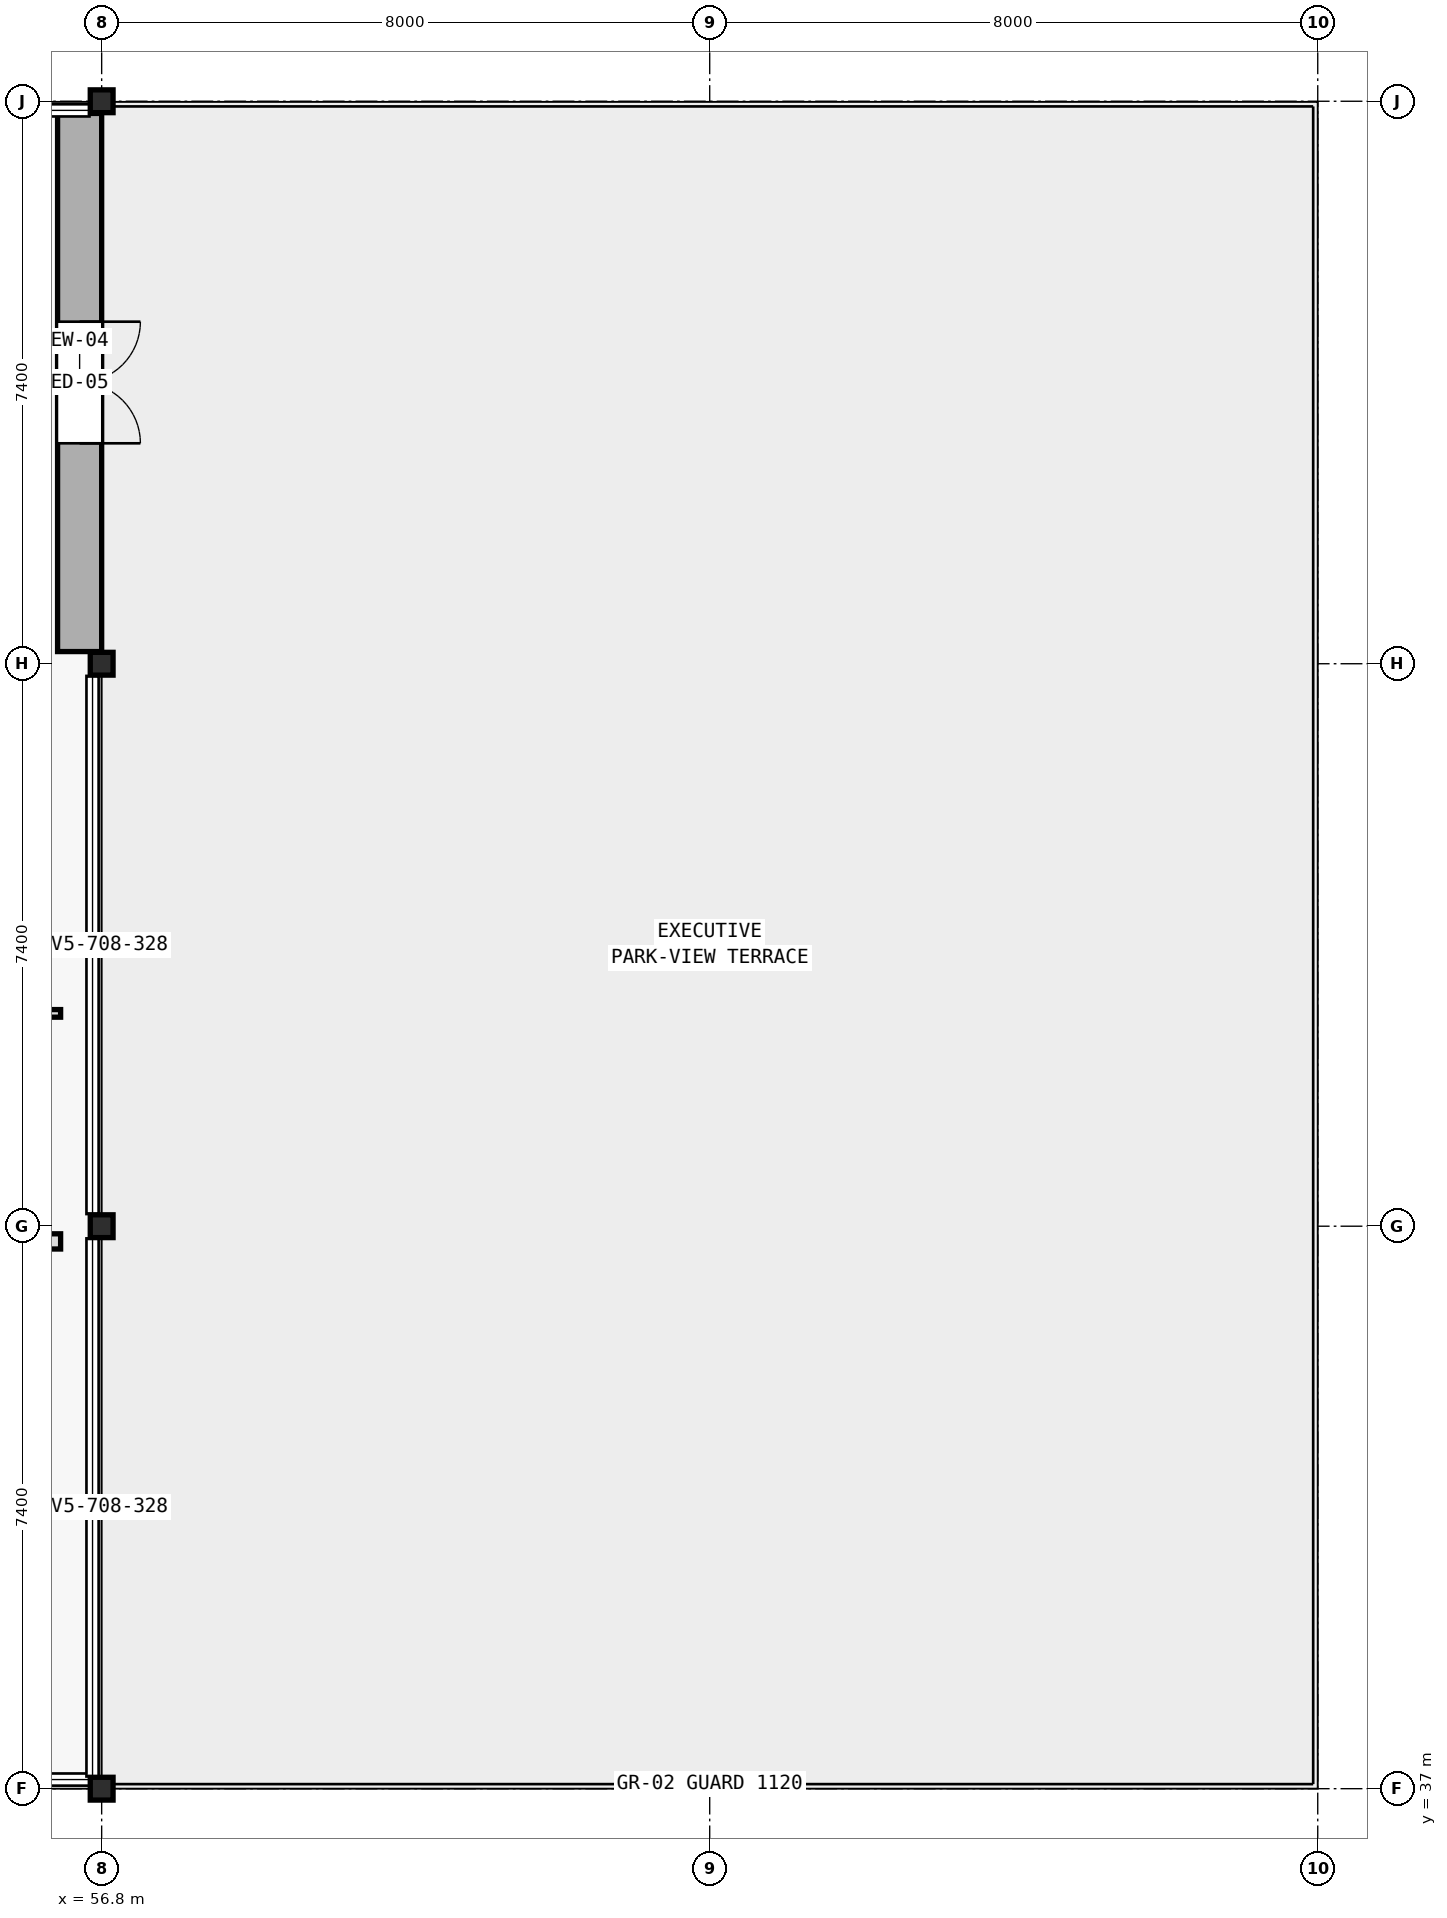
"""IFC4 building model, lengths in metres.
Left out: names, types, materials, properties, quantities, classifications, styles, units other than length and angle.
Written with IfcOpenShell. Run it as: python <this file> out.ifc"""

import sys

from ifc_helpers import new_model, si_unit, direction, frame, frame_2d, origin, origin_2d, place, context, subcontext, project, spatial, rectangle, i_section, extrude, element, fill, save


model = new_model("IFC4")
c1 = context("Model", 3, precision=1e-05, world=origin(), true_north=direction((0.0, 1.0)))
c2 = subcontext(c1, "Body", "Model", "MODEL_VIEW")
j1 = project(units=[si_unit("LENGTHUNIT", "METRE"), si_unit("PLANEANGLEUNIT", "RADIAN")], contexts=[c1])
p1 = place(None, origin())
s1 = spatial("IfcSite", under=j1, at=p1, CompositionType="ELEMENT")
p2 = place(p1, origin())
s2 = spatial("IfcBuilding", under=s1, at=p2, CompositionType="ELEMENT")
p3 = place(p2, frame((0.0, 0.0, 31.1)))
s3 = spatial("IfcBuildingStorey", under=s2, at=p3, CompositionType="ELEMENT", Elevation=31.1)
for number, where, z_axis, x_axis in (
    (1, (56.8, 37.0, 0.0), (0.0, 0.0, 1.0), (1.0, 0.0, 0.0)),
    (2, (56.8, 44.4, 0.0), (0.0, 0.0, 1.0), (1.0, 0.0, 0.0)),
    (3, (56.8, 51.8, 0.0), (0.0, 0.0, 1.0), (1.0, 0.0, 0.0)),
    (4, (56.8, 59.2, 0.0), (0.0, 0.0, 1.0), (1.0, 0.0, 0.0)),
):
    element("IfcColumn", number, at=place(p3, frame(where, z_axis=z_axis, x_axis=x_axis)), inside=s3, PredefinedType="COLUMN", context=c2, shape_type="SweptSolid", body=[
        extrude(i_section(OverallWidth=0.3, OverallDepth=0.3, WebThickness=0.011, FlangeThickness=0.019, FilletRadius=0.027, at=origin_2d()), origin(), (0.0, 0.0, 1.0), 3.9),
    ])
p4 = place(p3, frame((56.51, 59.04, 0.0), z_axis=(0.0, 0.0, 1.0), x_axis=(0.0, -1.0, 0.0)))
e5 = element("IfcWall", 5, at=p4, inside=s3, PredefinedType="STANDARD", context=c2, shape_type="SweptSolid", body=[
    extrude(rectangle(XDim=7.08, YDim=0.58, at=frame_2d((3.54, 0.0))), origin(), (0.0, 0.0, 1.0), 3.62),
])
p5 = place(p4, frame((2.74, 0.0, 0.0)))
e6 = element("IfcOpeningElement", 6, at=p5, cuts=e5, PredefinedType="OPENING", context=c2, shape_type="SweptSolid", body=[
    extrude(rectangle(XDim=1.6, YDim=2.3, at=frame_2d((0.8, 1.15))), frame((0.0, 0.3, 0.0), z_axis=(0.0, -1.0, 0.0), x_axis=(1.0, 0.0, 0.0)), (0.0, 0.0, 1.0), 0.6),
])
p6 = place(p3, frame((54.14, 47.2, 0.0), z_axis=(0.0, 0.0, 1.0), x_axis=(1.0, 0.0, 0.0)))
e7 = element("IfcWall", 7, at=p6, inside=s3, PredefinedType="PARTITIONING", context=c2, shape_type="SweptSolid", body=[
    extrude(rectangle(XDim=2.12, YDim=0.1, at=frame_2d((1.06, 0.0))), origin(), (0.0, 0.0, 1.0), 3.62),
])
p7 = place(p6, frame((0.56, 0.0, 0.0)))
e8 = element("IfcOpeningElement", 8, at=p7, cuts=e7, PredefinedType="OPENING", context=c2, shape_type="SweptSolid", body=[
    extrude(rectangle(XDim=1.0, YDim=2.2, at=frame_2d((0.5, 1.1))), frame((0.0, 0.06, 0.0), z_axis=(0.0, -1.0, 0.0), x_axis=(1.0, 0.0, 0.0)), (0.0, 0.0, 1.0), 0.12),
])
p8 = place(p3, frame((52.74, 44.2, 0.0), z_axis=(0.0, 0.0, 1.0), x_axis=(1.0, 0.0, 0.0)))
e9 = element("IfcWall", 9, at=p8, inside=s3, PredefinedType="STANDARD", context=c2, shape_type="SweptSolid", body=[
    extrude(rectangle(XDim=3.52, YDim=0.2, at=frame_2d((1.76, 0.0))), origin(), (0.0, 0.0, 1.0), 3.33),
])
p9 = place(p8, frame((0.91, 0.0, 0.0)))
e10 = element("IfcOpeningElement", 10, at=p9, cuts=e9, PredefinedType="OPENING", context=c2, shape_type="SweptSolid", body=[
    extrude(rectangle(XDim=1.7, YDim=2.4, at=frame_2d((0.85, 1.2))), frame((0.0, 0.11, 0.0), z_axis=(0.0, -1.0, 0.0), x_axis=(1.0, 0.0, 0.0)), (0.0, 0.0, 1.0), 0.22),
])
p10 = place(p5, origin())
e11 = element("IfcDoor", 11, at=p10, inside=s3, OperationType="DOUBLE_DOOR_SINGLE_SWING", PredefinedType="DOOR", context=c2, shape_type="SweptSolid", body=[
    extrude(rectangle(XDim=1.6, YDim=2.3, at=frame_2d((0.8, 1.15))), frame((0.0, 0.025, 0.0), z_axis=(0.0, -1.0, 0.0), x_axis=(1.0, 0.0, 0.0)), (0.0, 0.0, 1.0), 0.05),
])
fill(e6, e11)
save(model, sys.argv[1])
